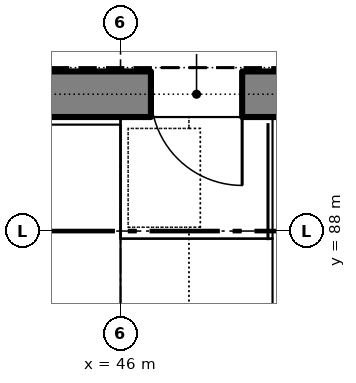
"""IFC4 building model, lengths in metres.
Left out: names, types, materials, properties, quantities, classifications, styles, units other than length and angle.
Written with IfcOpenShell. Run it as: python <this file> out.ifc"""

import sys

from ifc_helpers import new_model, si_unit, direction, frame, frame_2d, origin, place, context, subcontext, project, spatial, rectangle, extrude, element, fill, save


model = new_model("IFC4")
c1 = context("Model", 3, precision=1e-05, world=origin(), true_north=direction((0.0, 1.0)))
c2 = subcontext(c1, "Body", "Model", "MODEL_VIEW")
j1 = project(units=[si_unit("LENGTHUNIT", "METRE"), si_unit("PLANEANGLEUNIT", "RADIAN")], contexts=[c1])
p1 = place(None, origin())
s1 = spatial("IfcSite", under=j1, at=p1, CompositionType="ELEMENT")
p2 = place(p1, origin())
s2 = spatial("IfcBuilding", under=s1, at=p2, CompositionType="ELEMENT")
p3 = place(p2, frame((0.0, 0.0, 5.4)))
s3 = spatial("IfcBuildingStorey", under=s2, at=p3, CompositionType="ELEMENT", Elevation=5.4)
p4 = place(p3, frame((36.5, 89.8, 0.0), z_axis=(0.0, 0.0, 1.0), x_axis=(1.0, 0.0, 0.0)))
e1 = element("IfcWall", 1, at=p4, inside=s3, PredefinedType="SOLIDWALL", context=c2, shape_type="SweptSolid", body=[
    extrude(rectangle(XDim=52.6, YDim=0.6, at=frame_2d((26.3, 0.0))), origin(), (0.0, 0.0, 1.0), 4.8),
])
p5 = place(p4, frame((9.9, 0.0, 0.0)))
e2 = element("IfcOpeningElement", 2, at=p5, cuts=e1, PredefinedType="OPENING", context=c2, shape_type="SweptSolid", body=[
    extrude(rectangle(XDim=1.2, YDim=2.1, at=frame_2d((0.6, 1.05))), frame((0.0, 0.31, 0.0), z_axis=(0.0, -1.0, 0.0), x_axis=(1.0, 0.0, 0.0)), (0.0, 0.0, 1.0), 0.62),
])
p6 = place(p4, frame((15.4, 0.0, 0.0)))
e3 = element("IfcOpeningElement", 3, at=p6, cuts=e1, PredefinedType="OPENING", context=c2, shape_type="SweptSolid", body=[
    extrude(rectangle(XDim=1.2, YDim=2.1, at=frame_2d((0.6, 1.05))), frame((0.0, 0.31, 0.0), z_axis=(0.0, -1.0, 0.0), x_axis=(1.0, 0.0, 0.0)), (0.0, 0.0, 1.0), 0.62),
])
p7 = place(p4, frame((32.4, 0.0, 0.0)))
e4 = element("IfcOpeningElement", 4, at=p7, cuts=e1, PredefinedType="OPENING", context=c2, shape_type="SweptSolid", body=[
    extrude(rectangle(XDim=1.2, YDim=2.1, at=frame_2d((0.6, 1.05))), frame((0.0, 0.31, 0.0), z_axis=(0.0, -1.0, 0.0), x_axis=(1.0, 0.0, 0.0)), (0.0, 0.0, 1.0), 0.62),
])
p8 = place(p5, frame((1.2, 0.0, 0.0), z_axis=(0.0, 0.0, 1.0), x_axis=(-1.0, 0.0, 0.0)))
e5 = element("IfcDoor", 5, at=p8, inside=s3, OperationType="SINGLE_SWING_LEFT", PredefinedType="DOOR", context=c2, shape_type="SweptSolid", body=[
    extrude(rectangle(XDim=1.2, YDim=2.1, at=frame_2d((0.6, 1.05))), frame((0.0, 0.025, 0.0), z_axis=(0.0, -1.0, 0.0), x_axis=(1.0, 0.0, 0.0)), (0.0, 0.0, 1.0), 0.05),
])
fill(e2, e5)
save(model, sys.argv[1])
